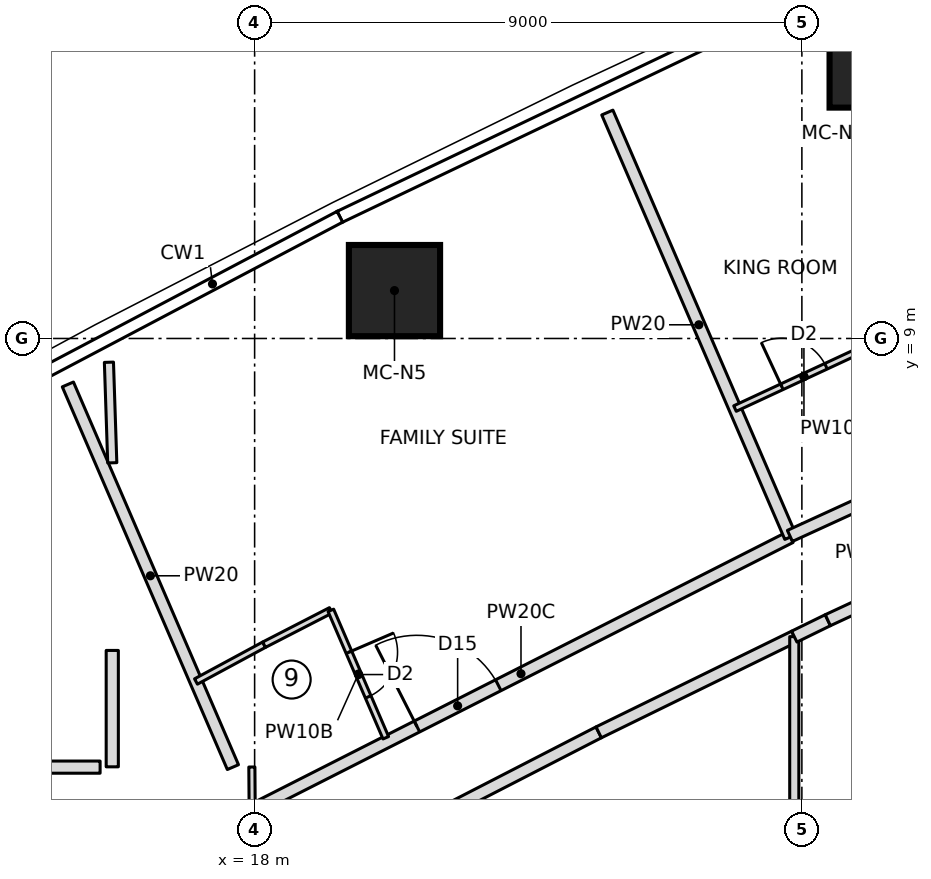
"""IFC4 building model, lengths in metres.
Left out: names, types, materials, properties, quantities, classifications, styles, units other than length and angle.
Written with IfcOpenShell. Run it as: python <this file> out.ifc"""

import sys

from ifc_helpers import new_model, si_unit, direction, frame, frame_2d, origin, origin_2d, place, context, subcontext, project, spatial, rectangle, extrude, element, fill, save


model = new_model("IFC4")
c1 = context("Model", 3, precision=1e-05, world=origin(), true_north=direction((0.0, 1.0)))
c2 = subcontext(c1, "Body", "Model", "MODEL_VIEW")
j1 = project(units=[si_unit("LENGTHUNIT", "METRE"), si_unit("PLANEANGLEUNIT", "RADIAN")], contexts=[c1])
p1 = place(None, origin())
s1 = spatial("IfcSite", under=j1, at=p1, CompositionType="ELEMENT")
p2 = place(p1, origin())
s2 = spatial("IfcBuilding", under=s1, at=p2, CompositionType="ELEMENT")
p3 = place(p2, frame((0.0, 0.0, 147.95)))
s3 = spatial("IfcBuildingStorey", under=s2, at=p3, CompositionType="ELEMENT", Elevation=147.95)
for number, where, z_axis, x_axis in (
    (1, (28.205, 13.547, 0.0), (0.0, 0.0, 1.0), (1.0, 0.0, 0.0)),
    (2, (20.3, 9.788, 0.0), (0.0, 0.0, 1.0), (1.0, 0.0, 0.0)),
):
    element("IfcColumn", number, at=place(p3, frame(where, z_axis=z_axis, x_axis=x_axis)), inside=s3, PredefinedType="COLUMN", context=c2, shape_type="SweptSolid", body=[
        extrude(rectangle(XDim=1.5, YDim=1.5, at=origin_2d()), origin(), (0.0, 0.0, 1.0), 3.55),
    ])
p4 = place(p3, frame((5.654, 1.95, 0.0), z_axis=(0.0, 0.0, 1.0), x_axis=(1.0, 0.0, 0.0)))
e3 = element("IfcWall", 3, at=p4, inside=s3, PredefinedType="PARTITIONING", context=c2, shape_type="SweptSolid", body=[
    extrude(rectangle(XDim=9.804, YDim=0.2, at=frame_2d((4.902, 0.0))), origin(), (0.0, 0.0, 1.0), 3.25),
])
p5 = place(p4, frame((4.618, 0.0, 0.0)))
e4 = element("IfcOpeningElement", 4, at=p5, cuts=e3, PredefinedType="OPENING", context=c2, shape_type="SweptSolid", body=[
    extrude(rectangle(XDim=1.0, YDim=2.1, at=frame_2d((0.5, 1.05))), frame((0.0, 0.11, 0.0), z_axis=(0.0, -1.0, 0.0), x_axis=(1.0, 0.0, 0.0)), (0.0, 0.0, 1.0), 0.22),
])
p6 = place(p3, frame((17.643, 1.95, 0.0), z_axis=(0.0, 0.0, 1.0), x_axis=(-0.395994543879, 0.918252863441, 0.0)))
e5 = element("IfcWall", 5, at=p6, inside=s3, PredefinedType="PARTITIONING", context=c2, shape_type="SweptSolid", body=[
    extrude(rectangle(XDim=6.854, YDim=0.2, at=frame_2d((3.427, 0.0))), origin(), (0.0, 0.0, 1.0), 3.25),
])
p7 = place(p3, frame((17.95, 1.238, 0.0), z_axis=(0.0, 0.0, 1.0), x_axis=(0.891757990421, 0.452512636863, 0.0)))
e6 = element("IfcWall", 6, at=p7, inside=s3, PredefinedType="PARTITIONING", context=c2, shape_type="SweptSolid", body=[
    extrude(rectangle(XDim=9.937, YDim=0.2, at=frame_2d((4.969, 0.0))), origin(), (0.0, 0.0, 1.0), 3.25),
])
p8 = place(p7, frame((3.05, 0.0, 0.0)))
e7 = element("IfcOpeningElement", 7, at=p8, cuts=e6, PredefinedType="OPENING", context=c2, shape_type="SweptSolid", body=[
    extrude(rectangle(XDim=1.5, YDim=2.1, at=frame_2d((0.75, 1.05))), frame((0.0, 0.11, 0.0), z_axis=(0.0, -1.0, 0.0), x_axis=(1.0, 0.0, 0.0)), (0.0, 0.0, 1.0), 0.22),
])
p9 = place(p3, frame((17.036, 3.358, 0.0), z_axis=(0.0, 0.0, 1.0), x_axis=(0.879823588489, 0.475300382009, 0.0)))
e8 = element("IfcWall", 8, at=p9, inside=s3, PredefinedType="PARTITIONING", context=c2, shape_type="SweptSolid", body=[
    extrude(rectangle(XDim=1.273, YDim=0.1, at=frame_2d((0.636, 0.0))), origin(), (0.0, 0.0, 1.0), 3.25),
])
p10 = place(p3, frame((18.156, 3.963, 0.0), z_axis=(0.0, 0.0, 1.0), x_axis=(0.889106231322, 0.457700895154, 0.0)))
e9 = element("IfcWall", 9, at=p10, inside=s3, PredefinedType="PARTITIONING", context=c2, shape_type="SweptSolid", body=[
    extrude(rectangle(XDim=1.235, YDim=0.1, at=frame_2d((0.617, 0.0))), origin(), (0.0, 0.0, 1.0), 3.25),
])
p11 = place(p3, frame((19.254, 4.529, 0.0), z_axis=(0.0, 0.0, 1.0), x_axis=(0.395958457437, -0.9182684248, 0.0)))
e10 = element("IfcWall", 10, at=p11, inside=s3, PredefinedType="PARTITIONING", context=c2, shape_type="SweptSolid", body=[
    extrude(rectangle(XDim=2.282, YDim=0.1, at=frame_2d((1.141, 0.0))), origin(), (0.0, 0.0, 1.0), 3.25),
])
p12 = place(p11, frame((0.75, 0.0, 0.0)))
e11 = element("IfcOpeningElement", 11, at=p12, cuts=e10, PredefinedType="OPENING", context=c2, shape_type="SweptSolid", body=[
    extrude(rectangle(XDim=0.8, YDim=2.1, at=frame_2d((0.4, 1.05))), frame((0.0, 0.06, 0.0), z_axis=(0.0, -1.0, 0.0), x_axis=(1.0, 0.0, 0.0)), (0.0, 0.0, 1.0), 0.12),
])
p13 = place(p3, frame((26.811, 5.735, 0.0), z_axis=(0.0, 0.0, 1.0), x_axis=(-0.395995556294, 0.918252426839, 0.0)))
e12 = element("IfcWall", 12, at=p13, inside=s3, PredefinedType="PARTITIONING", context=c2, shape_type="SweptSolid", body=[
    extrude(rectangle(XDim=7.603, YDim=0.2, at=frame_2d((3.802, 0.0))), origin(), (0.0, 0.0, 1.0), 3.25),
])
p14 = place(p3, frame((26.803, 5.753, 0.0), z_axis=(0.0, 0.0, 1.0), x_axis=(0.90910092787, 0.416575926987, 0.0)))
e13 = element("IfcWall", 13, at=p14, inside=s3, PredefinedType="PARTITIONING", context=c2, shape_type="SweptSolid", body=[
    extrude(rectangle(XDim=4.375, YDim=0.2, at=frame_2d((2.188, 0.0))), origin(), (0.0, 0.0, 1.0), 3.25),
])
p15 = place(p14, frame((3.05, 0.0, 0.0)))
e14 = element("IfcOpeningElement", 14, at=p15, cuts=e13, PredefinedType="OPENING", context=c2, shape_type="SweptSolid", body=[
    extrude(rectangle(XDim=1.0, YDim=2.1, at=frame_2d((0.5, 1.05))), frame((0.0, 0.11, 0.0), z_axis=(0.0, -1.0, 0.0), x_axis=(1.0, 0.0, 0.0)), (0.0, 0.0, 1.0), 0.22),
])
p16 = place(p3, frame((25.9, 7.847, 0.0), z_axis=(0.0, 0.0, 1.0), x_axis=(0.906813113059, 0.421532890751, 0.0)))
e15 = element("IfcWall", 15, at=p16, inside=s3, PredefinedType="PARTITIONING", context=c2, shape_type="SweptSolid", body=[
    extrude(rectangle(XDim=2.501, YDim=0.1, at=frame_2d((1.25, 0.0))), origin(), (0.0, 0.0, 1.0), 3.25),
])
p17 = place(p16, frame((0.85, 0.0, 0.0)))
e16 = element("IfcOpeningElement", 16, at=p17, cuts=e15, PredefinedType="OPENING", context=c2, shape_type="SweptSolid", body=[
    extrude(rectangle(XDim=0.8, YDim=2.1, at=frame_2d((0.4, 1.05))), frame((0.0, 0.06, 0.0), z_axis=(0.0, -1.0, 0.0), x_axis=(1.0, 0.0, 0.0)), (0.0, 0.0, 1.0), 0.12),
])
p18 = place(p3, frame((30.781, 7.575, 0.0), z_axis=(0.0, 0.0, 1.0), x_axis=(-0.396004020147, 0.918248776763, 0.0)))
e17 = element("IfcWall", 17, at=p18, inside=s3, PredefinedType="PARTITIONING", context=c2, shape_type="SweptSolid", body=[
    extrude(rectangle(XDim=7.6, YDim=0.2, at=frame_2d((3.8, 0.0))), origin(), (0.0, 0.0, 1.0), 3.25),
])
p19 = place(p3, frame((19.928, 0.602, 0.0), z_axis=(0.0, 0.0, 1.0), x_axis=(0.889140337289, 0.457634636589, 0.0)))
e18 = element("IfcWall", 18, at=p19, inside=s3, PredefinedType="PARTITIONING", context=c2, shape_type="SweptSolid", body=[
    extrude(rectangle(XDim=4.195, YDim=0.2, at=frame_2d((2.098, 0.0))), origin(), (0.0, 0.0, 1.0), 3.25),
])
p20 = place(p3, frame((23.659, 2.522, 0.0), z_axis=(0.0, 0.0, 1.0), x_axis=(0.898158871209, 0.439671061214, 0.0)))
e19 = element("IfcWall", 19, at=p20, inside=s3, PredefinedType="PARTITIONING", context=c2, shape_type="SweptSolid", body=[
    extrude(rectangle(XDim=3.581, YDim=0.2, at=frame_2d((1.791, 0.0))), origin(), (0.0, 0.0, 1.0), 3.25),
])
p21 = place(p3, frame((26.875, -4.096, 0.0), z_axis=(0.0, 0.0, 1.0), x_axis=(0.0, 1.0, 0.0)))
e20 = element("IfcWall", 20, at=p21, inside=s3, PredefinedType="PARTITIONING", context=c2, shape_type="SweptSolid", body=[
    extrude(rectangle(XDim=8.193, YDim=0.15, at=frame_2d((4.096, 0.0))), origin(), (0.0, 0.0, 1.0), 3.25),
])
p22 = place(p3, frame((26.875, 4.096, 0.0), z_axis=(0.0, 0.0, 1.0), x_axis=(0.898053097245, 0.439887070199, 0.0)))
e21 = element("IfcWall", 21, at=p22, inside=s3, PredefinedType="PARTITIONING", context=c2, shape_type="SweptSolid", body=[
    extrude(rectangle(XDim=0.615, YDim=0.2, at=frame_2d((0.307, 0.0))), origin(), (0.0, 0.0, 1.0), 3.25),
])
p23 = place(p3, frame((27.427, 4.367, 0.0), z_axis=(0.0, 0.0, 1.0), x_axis=(0.906831253463, 0.421493864419, 0.0)))
e22 = element("IfcWall", 22, at=p23, inside=s3, PredefinedType="PARTITIONING", context=c2, shape_type="SweptSolid", body=[
    extrude(rectangle(XDim=2.7, YDim=0.2, at=frame_2d((1.35, 0.0))), origin(), (0.0, 0.0, 1.0), 3.25),
])
p24 = place(p3, frame((15.604, 8.609, 0.0), z_axis=(0.0, 0.0, 1.0), x_axis=(0.033196927484, -0.999448830109, 0.0)))
e23 = element("IfcWall", 23, at=p24, inside=s3, PredefinedType="PARTITIONING", context=c2, shape_type="SweptSolid", body=[
    extrude(rectangle(XDim=1.655, YDim=0.15, at=frame_2d((0.827, 0.0))), origin(), (0.0, 0.0, 1.0), 3.25),
])
p25 = place(p3, frame((17.96, 1.249, 0.0), z_axis=(0.0, 0.0, 1.0), x_axis=(-0.007291472831, 0.999973416859, 0.0)))
e24 = element("IfcWall", 24, at=p25, inside=s3, PredefinedType="PARTITIONING", context=c2, shape_type="SweptSolid", body=[
    extrude(rectangle(XDim=0.703, YDim=0.1, at=frame_2d((0.352, 0.0))), origin(), (0.0, 0.0, 1.0), 3.25),
])
p26 = place(p3, frame((15.659, 3.869, 0.0), z_axis=(0.0, 0.0, 1.0), x_axis=(0.0, -1.0, 0.0)))
e25 = element("IfcWall", 25, at=p26, inside=s3, PredefinedType="PARTITIONING", context=c2, shape_type="SweptSolid", body=[
    extrude(rectangle(XDim=1.914, YDim=0.2, at=frame_2d((0.957, 0.0))), origin(), (0.0, 0.0, 1.0), 3.25),
])
p27 = place(p12, origin())
e26 = element("IfcDoor", 26, at=p27, inside=s3, OperationType="SINGLE_SWING_LEFT", PredefinedType="DOOR", context=c2, shape_type="SweptSolid", body=[
    extrude(rectangle(XDim=0.8, YDim=2.1, at=frame_2d((0.4, 1.05))), frame((0.0, 0.025, 0.0), z_axis=(0.0, -1.0, 0.0), x_axis=(1.0, 0.0, 0.0)), (0.0, 0.0, 1.0), 0.05),
])
fill(e11, e26)
p28 = place(p8, origin())
e27 = element("IfcDoor", 27, at=p28, inside=s3, OperationType="DOUBLE_DOOR_SINGLE_SWING", PredefinedType="DOOR", context=c2, shape_type="SweptSolid", body=[
    extrude(rectangle(XDim=1.5, YDim=2.1, at=frame_2d((0.75, 1.05))), frame((0.0, 0.025, 0.0), z_axis=(0.0, -1.0, 0.0), x_axis=(1.0, 0.0, 0.0)), (0.0, 0.0, 1.0), 0.05),
])
fill(e7, e27)
p29 = place(p17, origin())
e28 = element("IfcDoor", 28, at=p29, inside=s3, OperationType="SINGLE_SWING_LEFT", PredefinedType="DOOR", context=c2, shape_type="SweptSolid", body=[
    extrude(rectangle(XDim=0.8, YDim=2.1, at=frame_2d((0.4, 1.05))), frame((0.0, 0.025, 0.0), z_axis=(0.0, -1.0, 0.0), x_axis=(1.0, 0.0, 0.0)), (0.0, 0.0, 1.0), 0.05),
])
fill(e16, e28)
save(model, sys.argv[1])
